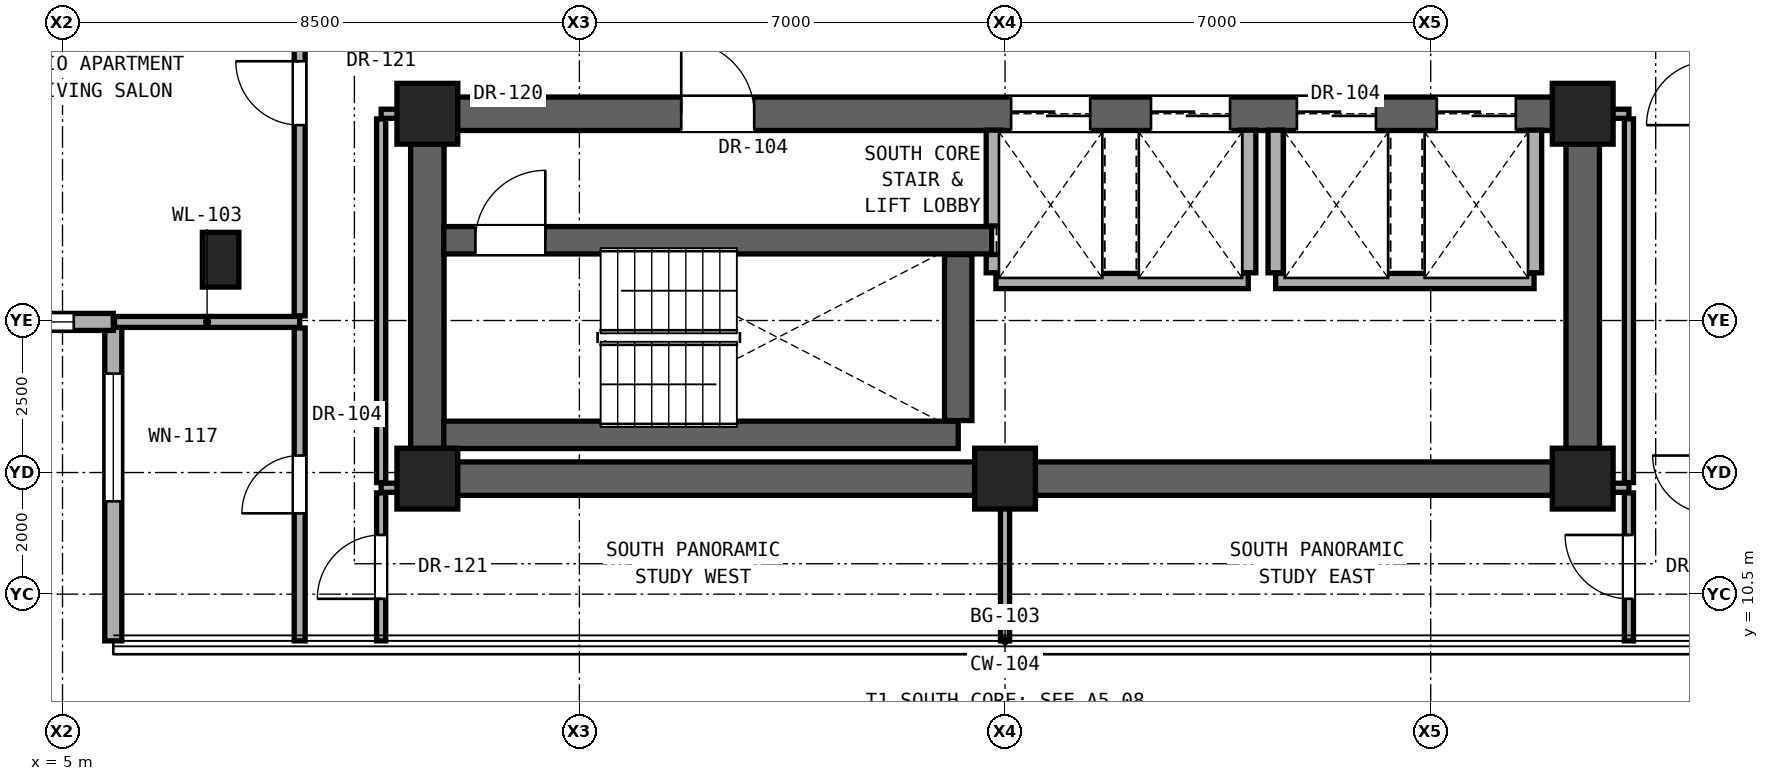
"""IFC4 building model, lengths in metres.
Left out: names, types, materials, properties, quantities, classifications, styles, units other than length and angle.
Written with IfcOpenShell. Run it as: python <this file> out.ifc"""

import sys

from ifc_helpers import new_model, si_unit, direction, frame, frame_2d, origin, origin_2d, place, context, subcontext, project, spatial, rectangle, extrude, element, fill, save


model = new_model("IFC4")
c1 = context("Model", 3, precision=1e-05, world=origin(), true_north=direction((0.0, 1.0)))
c2 = subcontext(c1, "Body", "Model", "MODEL_VIEW")
j1 = project(units=[si_unit("LENGTHUNIT", "METRE"), si_unit("PLANEANGLEUNIT", "RADIAN")], contexts=[c1])
p1 = place(None, origin())
s1 = spatial("IfcSite", under=j1, at=p1, CompositionType="ELEMENT")
p2 = place(p1, origin())
s2 = spatial("IfcBuilding", under=s1, at=p2, CompositionType="ELEMENT")
p3 = place(p2, frame((0.0, 0.0, 157.65)))
s3 = spatial("IfcBuildingStorey", under=s2, at=p3, CompositionType="ELEMENT", Elevation=157.65)
for number, where, z_axis, x_axis in (
    (1, (11.0, 12.4, 0.0), (0.0, 0.0, 1.0), (1.0, 0.0, 0.0)),
    (2, (20.5, 12.4, 0.0), (0.0, 0.0, 1.0), (1.0, 0.0, 0.0)),
    (3, (30.0, 12.4, 0.0), (0.0, 0.0, 1.0), (1.0, 0.0, 0.0)),
    (4, (11.0, 18.4, 0.0), (0.0, 0.0, 1.0), (1.0, 0.0, 0.0)),
    (5, (30.0, 18.4, 0.0), (0.0, 0.0, 1.0), (1.0, 0.0, 0.0)),
):
    element("IfcColumn", number, at=place(p3, frame(where, z_axis=z_axis, x_axis=x_axis)), inside=s3, PredefinedType="COLUMN", context=c2, shape_type="SweptSolid", body=[
        extrude(rectangle(XDim=1.0, YDim=1.0, at=origin_2d()), origin(), (0.0, 0.0, 1.0), 3.25),
    ])
p4 = place(p3, frame((7.6, 16.0, 0.0), z_axis=(0.0, 0.0, 1.0), x_axis=(1.0, 0.0, 0.0)))
e6 = element("IfcColumn", 6, at=p4, inside=s3, PredefinedType="PILASTER", context=c2, shape_type="SweptSolid", body=[
    extrude(rectangle(XDim=0.6, YDim=0.9, at=origin_2d()), origin(), (0.0, 0.0, 1.0), 3.25),
])
p5 = place(p3, frame((11.0, 12.4, 0.0), z_axis=(0.0, 0.0, 1.0), x_axis=(1.0, 0.0, 0.0)))
e7 = element("IfcWall", 7, at=p5, inside=s3, PredefinedType="SHEAR", context=c2, shape_type="SweptSolid", body=[
    extrude(rectangle(XDim=19.0, YDim=0.55, at=frame_2d((9.5, 0.0))), origin(), (0.0, 0.0, 1.0), 3.05),
])
for number, where, z_axis, x_axis in (
    (8, (11.0, 12.4, 0.0), (0.0, 0.0, 1.0), (0.0, 1.0, 0.0)),
    (9, (30.0, 12.4, 0.0), (0.0, 0.0, 1.0), (0.0, 1.0, 0.0)),
):
    element("IfcWall", number, at=place(p3, frame(where, z_axis=z_axis, x_axis=x_axis)), inside=s3, PredefinedType="SHEAR", context=c2, shape_type="SweptSolid", body=[
        extrude(rectangle(XDim=6.0, YDim=0.55, at=frame_2d((3.0, 0.0))), origin(), (0.0, 0.0, 1.0), 3.05),
    ])
p6 = place(p3, frame((11.0, 18.4, 0.0), z_axis=(0.0, 0.0, 1.0), x_axis=(1.0, 0.0, 0.0)))
e10 = element("IfcWall", 10, at=p6, inside=s3, PredefinedType="SHEAR", context=c2, shape_type="SweptSolid", body=[
    extrude(rectangle(XDim=19.0, YDim=0.55, at=frame_2d((9.5, 0.0))), origin(), (0.0, 0.0, 1.0), 3.05),
])
p7 = place(p6, frame((4.175, 0.0, 0.0)))
e11 = element("IfcOpeningElement", 11, at=p7, cuts=e10, PredefinedType="OPENING", context=c2, shape_type="SweptSolid", body=[
    extrude(rectangle(XDim=1.2, YDim=2.25, at=frame_2d((0.6, 1.125))), frame((0.0, 0.285, 0.0), z_axis=(0.0, -1.0, 0.0), x_axis=(1.0, 0.0, 0.0)), (0.0, 0.0, 1.0), 0.57),
])
p8 = place(p6, frame((9.6, 0.0, 0.0)))
e12 = element("IfcOpeningElement", 12, at=p8, cuts=e10, PredefinedType="OPENING", context=c2, shape_type="SweptSolid", body=[
    extrude(rectangle(XDim=1.3, YDim=2.3, at=frame_2d((0.65, 1.15))), frame((0.0, 0.285, 0.0), z_axis=(0.0, -1.0, 0.0), x_axis=(1.0, 0.0, 0.0)), (0.0, 0.0, 1.0), 0.57),
])
p9 = place(p6, frame((11.9, 0.0, 0.0)))
e13 = element("IfcOpeningElement", 13, at=p9, cuts=e10, PredefinedType="OPENING", context=c2, shape_type="SweptSolid", body=[
    extrude(rectangle(XDim=1.3, YDim=2.3, at=frame_2d((0.65, 1.15))), frame((0.0, 0.285, 0.0), z_axis=(0.0, -1.0, 0.0), x_axis=(1.0, 0.0, 0.0)), (0.0, 0.0, 1.0), 0.57),
])
p10 = place(p6, frame((14.3, 0.0, 0.0)))
e14 = element("IfcOpeningElement", 14, at=p10, cuts=e10, PredefinedType="OPENING", context=c2, shape_type="SweptSolid", body=[
    extrude(rectangle(XDim=1.3, YDim=2.3, at=frame_2d((0.65, 1.15))), frame((0.0, 0.285, 0.0), z_axis=(0.0, -1.0, 0.0), x_axis=(1.0, 0.0, 0.0)), (0.0, 0.0, 1.0), 0.57),
])
p11 = place(p6, frame((16.6, 0.0, 0.0)))
e15 = element("IfcOpeningElement", 15, at=p11, cuts=e10, PredefinedType="OPENING", context=c2, shape_type="SweptSolid", body=[
    extrude(rectangle(XDim=1.3, YDim=2.3, at=frame_2d((0.65, 1.15))), frame((0.0, 0.285, 0.0), z_axis=(0.0, -1.0, 0.0), x_axis=(1.0, 0.0, 0.0)), (0.0, 0.0, 1.0), 0.57),
])
p12 = place(p3, frame((5.835, 14.977, 0.0), z_axis=(0.0, 0.0, 1.0), x_axis=(0.0, -1.0, 0.0)))
e16 = element("IfcWall", 16, at=p12, inside=s3, PredefinedType="SOLIDWALL", context=c2, shape_type="SweptSolid", body=[
    extrude(rectangle(XDim=5.245, YDim=0.28, at=frame_2d((2.623, 0.0))), origin(), (0.0, 0.0, 1.0), 3.03),
])
p13 = place(p12, frame((0.85, 0.0, 0.68)))
e17 = element("IfcOpeningElement", 17, at=p13, cuts=e16, PredefinedType="OPENING", context=c2, shape_type="SweptSolid", body=[
    extrude(rectangle(XDim=2.1, YDim=2.2, at=frame_2d((1.05, 1.1))), frame((0.0, 0.15, 0.0), z_axis=(0.0, -1.0, 0.0), x_axis=(1.0, 0.0, 0.0)), (0.0, 0.0, 1.0), 0.3),
])
p14 = place(p3, frame((0.59, 14.977, 0.0), z_axis=(0.0, 0.0, 1.0), x_axis=(1.0, 0.0, 0.0)))
e18 = element("IfcWall", 18, at=p14, inside=s3, PredefinedType="SOLIDWALL", context=c2, shape_type="SweptSolid", body=[
    extrude(rectangle(XDim=5.245, YDim=0.28, at=frame_2d((2.623, 0.0))), origin(), (0.0, 0.0, 1.0), 3.03),
])
p15 = place(p14, frame((3.495, 0.0, 0.85)))
e19 = element("IfcOpeningElement", 19, at=p15, cuts=e18, PredefinedType="OPENING", context=c2, shape_type="SweptSolid", body=[
    extrude(rectangle(XDim=1.1, YDim=2.0, at=frame_2d((0.55, 1.0))), frame((0.0, 0.15, 0.0), z_axis=(0.0, -1.0, 0.0), x_axis=(1.0, 0.0, 0.0)), (0.0, 0.0, 1.0), 0.3),
])
for number, where, z_axis, x_axis in (
    (20, (10.24, 12.25, 0.0), (0.0, 0.0, 1.0), (1.0, 0.0, 0.0)),
    (21, (30.27, 12.25, 0.0), (0.0, 0.0, 1.0), (1.0, 0.0, 0.0)),
):
    element("IfcWall", number, at=place(p3, frame(where, z_axis=z_axis, x_axis=x_axis)), inside=s3, PredefinedType="PARTITIONING", context=c2, shape_type="SweptSolid", body=[
        extrude(rectangle(XDim=0.49, YDim=0.15, at=frame_2d((0.245, 0.0))), origin(), (0.0, 0.0, 1.0), 3.05),
    ])
p16 = place(p3, frame((11.27, 13.12, 0.0), z_axis=(0.0, 0.0, 1.0), x_axis=(1.0, 0.0, 0.0)))
e22 = element("IfcWall", 22, at=p16, inside=s3, PredefinedType="SHEAR", context=c2, shape_type="SweptSolid", body=[
    extrude(rectangle(XDim=8.46, YDim=0.45, at=frame_2d((4.23, 0.0))), origin(), (0.0, 0.0, 1.0), 3.05),
])
p17 = place(p3, frame((5.855, 14.977, 0.0), z_axis=(0.0, 0.0, 1.0), x_axis=(1.0, 0.0, 0.0)))
e23 = element("IfcWall", 23, at=p17, inside=s3, PredefinedType="PARTITIONING", context=c2, shape_type="SweptSolid", body=[
    extrude(rectangle(XDim=3.045, YDim=0.18, at=frame_2d((1.522, 0.0))), origin(), (0.0, 0.0, 1.0), 3.05),
])
p18 = place(p3, frame((20.35, 15.65, 0.0), z_axis=(0.0, 0.0, 1.0), x_axis=(1.0, 0.0, 0.0)))
e24 = element("IfcWall", 24, at=p18, inside=s3, PredefinedType="SOLIDWALL", context=c2, shape_type="SweptSolid", body=[
    extrude(rectangle(XDim=4.15, YDim=0.25, at=frame_2d((2.075, 0.0))), origin(), (0.0, 0.0, 1.0), 3.05),
])
p19 = place(p3, frame((24.95, 15.65, 0.0), z_axis=(0.0, 0.0, 1.0), x_axis=(1.0, 0.0, 0.0)))
e25 = element("IfcWall", 25, at=p19, inside=s3, PredefinedType="SOLIDWALL", context=c2, shape_type="SweptSolid", body=[
    extrude(rectangle(XDim=4.25, YDim=0.25, at=frame_2d((2.125, 0.0))), origin(), (0.0, 0.0, 1.0), 3.05),
])
p20 = place(p3, frame((11.27, 16.32, 0.0), z_axis=(0.0, 0.0, 1.0), x_axis=(1.0, 0.0, 0.0)))
e26 = element("IfcWall", 26, at=p20, inside=s3, PredefinedType="SHEAR", context=c2, shape_type="SweptSolid", body=[
    extrude(rectangle(XDim=9.01, YDim=0.45, at=frame_2d((4.505, 0.0))), origin(), (0.0, 0.0, 1.0), 3.05),
])
p21 = place(p20, frame((0.52, 0.0, 0.0)))
e27 = element("IfcOpeningElement", 27, at=p21, cuts=e26, PredefinedType="OPENING", context=c2, shape_type="SweptSolid", body=[
    extrude(rectangle(XDim=1.15, YDim=2.2, at=frame_2d((0.575, 1.1))), frame((0.0, 0.235, 0.0), z_axis=(0.0, -1.0, 0.0), x_axis=(1.0, 0.0, 0.0)), (0.0, 0.0, 1.0), 0.47),
])
for number, where, z_axis, x_axis in (
    (28, (10.24, 18.4, 0.0), (0.0, 0.0, 1.0), (1.0, 0.0, 0.0)),
    (29, (30.27, 18.4, 0.0), (0.0, 0.0, 1.0), (1.0, 0.0, 0.0)),
):
    element("IfcWall", number, at=place(p3, frame(where, z_axis=z_axis, x_axis=x_axis)), inside=s3, PredefinedType="PARTITIONING", context=c2, shape_type="SweptSolid", body=[
        extrude(rectangle(XDim=0.49, YDim=0.15, at=frame_2d((0.245, 0.0))), origin(), (0.0, 0.0, 1.0), 2.442),
    ])
p22 = place(p3, frame((8.9, 9.732, 0.0), z_axis=(0.0, 0.0, 1.0), x_axis=(0.0, 1.0, 0.0)))
e30 = element("IfcWall", 30, at=p22, inside=s3, PredefinedType="PARTITIONING", context=c2, shape_type="SweptSolid", body=[
    extrude(rectangle(XDim=5.145, YDim=0.18, at=frame_2d((2.573, 0.0))), origin(), (0.0, 0.0, 1.0), 3.05),
])
p23 = place(p22, frame((2.097, 0.0, 0.0)))
e31 = element("IfcOpeningElement", 31, at=p23, cuts=e30, PredefinedType="OPENING", context=c2, shape_type="SweptSolid", body=[
    extrude(rectangle(XDim=0.95, YDim=2.15, at=frame_2d((0.475, 1.075))), frame((0.0, 0.1, 0.0), z_axis=(0.0, -1.0, 0.0), x_axis=(1.0, 0.0, 0.0)), (0.0, 0.0, 1.0), 0.2),
])
p24 = place(p3, frame((8.9, 15.077, 0.0), z_axis=(0.0, 0.0, 1.0), x_axis=(0.0, 1.0, 0.0)))
e32 = element("IfcWall", 32, at=p24, inside=s3, PredefinedType="PARTITIONING", context=c2, shape_type="SweptSolid", body=[
    extrude(rectangle(XDim=7.323, YDim=0.18, at=frame_2d((3.662, 0.0))), origin(), (0.0, 0.0, 1.0), 2.442),
])
p25 = place(p24, frame((3.136, 0.0, 0.0)))
e33 = element("IfcOpeningElement", 33, at=p25, cuts=e32, PredefinedType="OPENING", context=c2, shape_type="SweptSolid", body=[
    extrude(rectangle(XDim=1.05, YDim=2.2, at=frame_2d((0.525, 1.1))), frame((0.0, 0.1, 0.0), z_axis=(0.0, -1.0, 0.0), x_axis=(1.0, 0.0, 0.0)), (0.0, 0.0, 1.0), 0.2),
])
p26 = place(p3, frame((10.24, 9.732, 0.0), z_axis=(0.0, 0.0, 1.0), x_axis=(0.0, 1.0, 0.0)))
e34 = element("IfcWall", 34, at=p26, inside=s3, PredefinedType="PARTITIONING", context=c2, shape_type="SweptSolid", body=[
    extrude(rectangle(XDim=2.433, YDim=0.15, at=frame_2d((1.217, 0.0))), origin(), (0.0, 0.0, 1.0), 3.05),
])
p27 = place(p26, frame((0.691, 0.0, 0.0)))
e35 = element("IfcOpeningElement", 35, at=p27, cuts=e34, PredefinedType="OPENING", context=c2, shape_type="SweptSolid", body=[
    extrude(rectangle(XDim=1.05, YDim=2.2, at=frame_2d((0.525, 1.1))), frame((0.0, 0.085, 0.0), z_axis=(0.0, -1.0, 0.0), x_axis=(1.0, 0.0, 0.0)), (0.0, 0.0, 1.0), 0.17),
])
p28 = place(p3, frame((10.24, 12.335, 0.0), z_axis=(0.0, 0.0, 1.0), x_axis=(0.0, 1.0, 0.0)))
e36 = element("IfcWall", 36, at=p28, inside=s3, PredefinedType="PARTITIONING", context=c2, shape_type="SweptSolid", body=[
    extrude(rectangle(XDim=5.98, YDim=0.15, at=frame_2d((2.99, 0.0))), origin(), (0.0, 0.0, 1.0), 2.442),
])
p29 = place(p3, frame((19.73, 13.355, 0.0), z_axis=(0.0, 0.0, 1.0), x_axis=(0.0, 1.0, 0.0)))
e37 = element("IfcWall", 37, at=p29, inside=s3, PredefinedType="SHEAR", context=c2, shape_type="SweptSolid", body=[
    extrude(rectangle(XDim=2.73, YDim=0.45, at=frame_2d((1.365, 0.0))), origin(), (0.0, 0.0, 1.0), 3.05),
])
p30 = place(p3, frame((20.315, 15.785, 0.0), z_axis=(0.0, 0.0, 1.0), x_axis=(0.0, 1.0, 0.0)))
e38 = element("IfcWall", 38, at=p30, inside=s3, PredefinedType="SOLIDWALL", context=c2, shape_type="SweptSolid", body=[
    extrude(rectangle(XDim=0.3, YDim=0.25, at=frame_2d((0.15, 0.0))), origin(), (0.0, 0.0, 1.0), 3.05),
])
p31 = place(p3, frame((20.315, 16.555, 0.0), z_axis=(0.0, 0.0, 1.0), x_axis=(0.0, 1.0, 0.0)))
e39 = element("IfcWall", 39, at=p31, inside=s3, PredefinedType="SOLIDWALL", context=c2, shape_type="SweptSolid", body=[
    extrude(rectangle(XDim=1.575, YDim=0.25, at=frame_2d((0.788, 0.0))), origin(), (0.0, 0.0, 1.0), 3.05),
])
p32 = place(p3, frame((20.5, 9.732, 0.0), z_axis=(0.0, 0.0, 1.0), x_axis=(0.0, 1.0, 0.0)))
e40 = element("IfcWall", 40, at=p32, inside=s3, PredefinedType="PARTITIONING", context=c2, shape_type="SweptSolid", body=[
    extrude(rectangle(XDim=2.398, YDim=0.15, at=frame_2d((1.199, 0.0))), origin(), (0.0, 0.0, 1.0), 3.05),
])
for number, where, z_axis, x_axis in (
    (41, (24.5, 15.785, 0.0), (0.0, 0.0, 1.0), (0.0, 1.0, 0.0)),
    (42, (24.95, 15.785, 0.0), (0.0, 0.0, 1.0), (0.0, 1.0, 0.0)),
    (43, (29.2, 15.785, 0.0), (0.0, 0.0, 1.0), (0.0, 1.0, 0.0)),
):
    element("IfcWall", number, at=place(p3, frame(where, z_axis=z_axis, x_axis=x_axis)), inside=s3, PredefinedType="SOLIDWALL", context=c2, shape_type="SweptSolid", body=[
        extrude(rectangle(XDim=2.345, YDim=0.25, at=frame_2d((1.172, 0.0))), origin(), (0.0, 0.0, 1.0), 3.05),
    ])
p33 = place(p3, frame((30.76, 9.732, 0.0), z_axis=(0.0, 0.0, 1.0), x_axis=(0.0, 1.0, 0.0)))
e44 = element("IfcWall", 44, at=p33, inside=s3, PredefinedType="PARTITIONING", context=c2, shape_type="SweptSolid", body=[
    extrude(rectangle(XDim=2.433, YDim=0.15, at=frame_2d((1.217, 0.0))), origin(), (0.0, 0.0, 1.0), 3.05),
])
p34 = place(p33, frame((0.691, 0.0, 0.0)))
e45 = element("IfcOpeningElement", 45, at=p34, cuts=e44, PredefinedType="OPENING", context=c2, shape_type="SweptSolid", body=[
    extrude(rectangle(XDim=1.05, YDim=2.2, at=frame_2d((0.525, 1.1))), frame((0.0, 0.085, 0.0), z_axis=(0.0, -1.0, 0.0), x_axis=(1.0, 0.0, 0.0)), (0.0, 0.0, 1.0), 0.17),
])
p35 = place(p3, frame((30.76, 12.335, 0.0), z_axis=(0.0, 0.0, 1.0), x_axis=(0.0, 1.0, 0.0)))
e46 = element("IfcWall", 46, at=p35, inside=s3, PredefinedType="PARTITIONING", context=c2, shape_type="SweptSolid", body=[
    extrude(rectangle(XDim=5.98, YDim=0.15, at=frame_2d((2.99, 0.0))), origin(), (0.0, 0.0, 1.0), 2.442),
])
p36 = place(p13, origin())
e47 = element("IfcWindow", 47, at=p36, inside=s3, PartitioningType="SINGLE_PANEL", PredefinedType="WINDOW", context=c2, shape_type="SweptSolid", body=[
    extrude(rectangle(XDim=2.1, YDim=2.2, at=frame_2d((1.05, 1.1))), frame((0.0, 0.03, 0.0), z_axis=(0.0, -1.0, 0.0), x_axis=(1.0, 0.0, 0.0)), (0.0, 0.0, 1.0), 0.06),
])
fill(e17, e47)
p37 = place(p15, origin())
e48 = element("IfcWindow", 48, at=p37, inside=s3, PartitioningType="SINGLE_PANEL", PredefinedType="WINDOW", context=c2, shape_type="SweptSolid", body=[
    extrude(rectangle(XDim=1.1, YDim=2.0, at=frame_2d((0.55, 1.0))), frame((0.0, 0.03, 0.0), z_axis=(0.0, -1.0, 0.0), x_axis=(1.0, 0.0, 0.0)), (0.0, 0.0, 1.0), 0.06),
])
fill(e19, e48)
p38 = place(p7, origin())
e49 = element("IfcDoor", 49, at=p38, inside=s3, OperationType="SINGLE_SWING_LEFT", PredefinedType="DOOR", context=c2, shape_type="SweptSolid", body=[
    extrude(rectangle(XDim=1.2, YDim=2.25, at=frame_2d((0.6, 1.125))), frame((0.0, 0.025, 0.0), z_axis=(0.0, -1.0, 0.0), x_axis=(1.0, 0.0, 0.0)), (0.0, 0.0, 1.0), 0.05),
])
fill(e11, e49)
p39 = place(p21, origin())
e50 = element("IfcDoor", 50, at=p39, inside=s3, OperationType="SINGLE_SWING_RIGHT", PredefinedType="DOOR", context=c2, shape_type="SweptSolid", body=[
    extrude(rectangle(XDim=1.15, YDim=2.2, at=frame_2d((0.575, 1.1))), frame((0.0, 0.025, 0.0), z_axis=(0.0, -1.0, 0.0), x_axis=(1.0, 0.0, 0.0)), (0.0, 0.0, 1.0), 0.05),
])
fill(e27, e50)
p40 = place(p25, origin())
e51 = element("IfcDoor", 51, at=p40, inside=s3, OperationType="SINGLE_SWING_RIGHT", PredefinedType="DOOR", context=c2, shape_type="SweptSolid", body=[
    extrude(rectangle(XDim=1.05, YDim=2.2, at=frame_2d((0.525, 1.1))), frame((0.0, 0.025, 0.0), z_axis=(0.0, -1.0, 0.0), x_axis=(1.0, 0.0, 0.0)), (0.0, 0.0, 1.0), 0.05),
])
fill(e33, e51)
p41 = place(p27, origin())
e52 = element("IfcDoor", 52, at=p41, inside=s3, OperationType="SINGLE_SWING_LEFT", PredefinedType="DOOR", context=c2, shape_type="SweptSolid", body=[
    extrude(rectangle(XDim=1.05, YDim=2.2, at=frame_2d((0.525, 1.1))), frame((0.0, 0.025, 0.0), z_axis=(0.0, -1.0, 0.0), x_axis=(1.0, 0.0, 0.0)), (0.0, 0.0, 1.0), 0.05),
])
fill(e35, e52)
p42 = place(p34, origin())
e53 = element("IfcDoor", 53, at=p42, inside=s3, OperationType="SINGLE_SWING_RIGHT", PredefinedType="DOOR", context=c2, shape_type="SweptSolid", body=[
    extrude(rectangle(XDim=1.05, YDim=2.2, at=frame_2d((0.525, 1.1))), frame((0.0, 0.025, 0.0), z_axis=(0.0, -1.0, 0.0), x_axis=(1.0, 0.0, 0.0)), (0.0, 0.0, 1.0), 0.05),
])
fill(e45, e53)
p43 = place(p23, origin())
e54 = element("IfcDoor", 54, at=p43, inside=s3, OperationType="SINGLE_SWING_LEFT", PredefinedType="DOOR", context=c2, shape_type="SweptSolid", body=[
    extrude(rectangle(XDim=0.95, YDim=2.15, at=frame_2d((0.475, 1.075))), frame((0.0, 0.025, 0.0), z_axis=(0.0, -1.0, 0.0), x_axis=(1.0, 0.0, 0.0)), (0.0, 0.0, 1.0), 0.05),
])
fill(e31, e54)
p44 = place(p8, origin())
e55 = element("IfcDoor", 55, at=p44, inside=s3, OperationType="DOUBLE_DOOR_SLIDING", PredefinedType="DOOR", context=c2, shape_type="SweptSolid", body=[
    extrude(rectangle(XDim=1.3, YDim=2.3, at=frame_2d((0.65, 1.15))), frame((0.0, 0.025, 0.0), z_axis=(0.0, -1.0, 0.0), x_axis=(1.0, 0.0, 0.0)), (0.0, 0.0, 1.0), 0.05),
])
fill(e12, e55)
p45 = place(p9, origin())
e56 = element("IfcDoor", 56, at=p45, inside=s3, OperationType="DOUBLE_DOOR_SLIDING", PredefinedType="DOOR", context=c2, shape_type="SweptSolid", body=[
    extrude(rectangle(XDim=1.3, YDim=2.3, at=frame_2d((0.65, 1.15))), frame((0.0, 0.025, 0.0), z_axis=(0.0, -1.0, 0.0), x_axis=(1.0, 0.0, 0.0)), (0.0, 0.0, 1.0), 0.05),
])
fill(e13, e56)
p46 = place(p10, origin())
e57 = element("IfcDoor", 57, at=p46, inside=s3, OperationType="DOUBLE_DOOR_SLIDING", PredefinedType="DOOR", context=c2, shape_type="SweptSolid", body=[
    extrude(rectangle(XDim=1.3, YDim=2.3, at=frame_2d((0.65, 1.15))), frame((0.0, 0.025, 0.0), z_axis=(0.0, -1.0, 0.0), x_axis=(1.0, 0.0, 0.0)), (0.0, 0.0, 1.0), 0.05),
])
fill(e14, e57)
p47 = place(p11, origin())
e58 = element("IfcDoor", 58, at=p47, inside=s3, OperationType="DOUBLE_DOOR_SLIDING", PredefinedType="DOOR", context=c2, shape_type="SweptSolid", body=[
    extrude(rectangle(XDim=1.3, YDim=2.3, at=frame_2d((0.65, 1.15))), frame((0.0, 0.025, 0.0), z_axis=(0.0, -1.0, 0.0), x_axis=(1.0, 0.0, 0.0)), (0.0, 0.0, 1.0), 0.05),
])
fill(e15, e58)
save(model, sys.argv[1])
